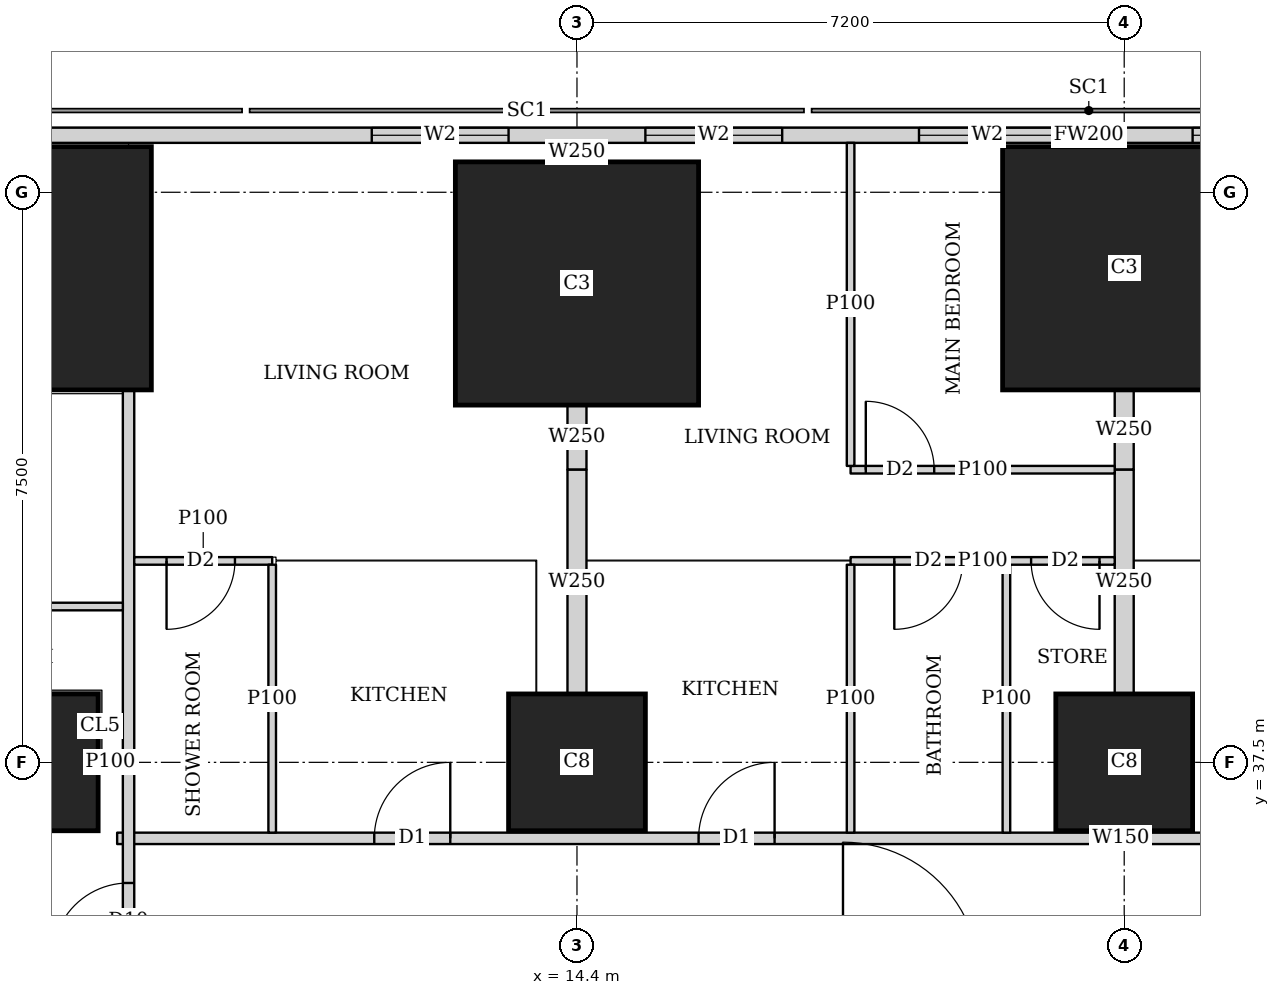
"""IFC4 building model, lengths in metres.
Left out: names, types, materials, properties, quantities, classifications, styles, units other than length and angle.
Written with IfcOpenShell. Run it as: python <this file> out.ifc"""

import sys

from ifc_helpers import new_model, si_unit, direction, frame, frame_2d, origin, origin_2d, place, context, subcontext, project, spatial, rectangle, extrude, element, fill, save


model = new_model("IFC4")
c1 = context("Model", 3, precision=1e-05, world=origin(), true_north=direction((0.0, 1.0)))
c2 = subcontext(c1, "Body", "Model", "MODEL_VIEW")
j1 = project(units=[si_unit("LENGTHUNIT", "METRE"), si_unit("PLANEANGLEUNIT", "RADIAN")], contexts=[c1])
p1 = place(None, origin())
s1 = spatial("IfcSite", under=j1, at=p1, CompositionType="ELEMENT")
p2 = place(p1, origin())
s2 = spatial("IfcBuilding", under=s1, at=p2, CompositionType="ELEMENT")
p3 = place(p2, frame((0.0, 0.0, 20.0)))
s3 = spatial("IfcBuildingStorey", under=s2, at=p3, CompositionType="ELEMENT", Elevation=20.0)
for number, where, z_axis, x_axis in (
    (1, (7.2, 37.5, 0.0), (0.0, 0.0, 1.0), (1.0, 0.0, 0.0)),
    (2, (14.4, 37.5, 0.0), (0.0, 0.0, 1.0), (1.0, 0.0, 0.0)),
    (3, (21.6, 37.5, 0.0), (0.0, 0.0, 1.0), (1.0, 0.0, 0.0)),
):
    element("IfcColumn", number, at=place(p3, frame(where, z_axis=z_axis, x_axis=x_axis)), inside=s3, PredefinedType="COLUMN", context=c2, shape_type="SweptSolid", body=[
        extrude(rectangle(XDim=1.8, YDim=1.8, at=origin_2d()), origin(), (0.0, 0.0, 1.0), 3.75),
    ])
p4 = place(p3, frame((7.2, 44.0, -0.3), z_axis=(0.0, 0.0, 1.0), x_axis=(1.0, 0.0, 0.0)))
e4 = element("IfcColumn", 4, at=p4, inside=s3, PredefinedType="COLUMN", context=c2, shape_type="SweptSolid", body=[
    extrude(rectangle(XDim=3.2, YDim=3.2, at=origin_2d()), origin(), (0.0, 0.0, 1.0), 4.05),
])
p5 = place(p3, frame((14.4, 43.8, 0.0), z_axis=(0.0, 0.0, 1.0), x_axis=(1.0, 0.0, 0.0)))
e5 = element("IfcColumn", 5, at=p5, inside=s3, PredefinedType="COLUMN", context=c2, shape_type="SweptSolid", body=[
    extrude(rectangle(XDim=3.2, YDim=3.2, at=origin_2d()), origin(), (0.0, 0.0, 1.0), 3.75),
])
p6 = place(p3, frame((21.6, 44.0, -0.3), z_axis=(0.0, 0.0, 1.0), x_axis=(1.0, 0.0, 0.0)))
e6 = element("IfcColumn", 6, at=p6, inside=s3, PredefinedType="COLUMN", context=c2, shape_type="SweptSolid", body=[
    extrude(rectangle(XDim=3.2, YDim=3.2, at=origin_2d()), origin(), (0.0, 0.0, 1.0), 4.05),
])
p7 = place(p3, frame((40.106, 45.75, 0.0), z_axis=(0.0, 0.0, 1.0), x_axis=(-1.0, 0.0, 0.0)))
e7 = element("IfcWall", 7, at=p7, inside=s3, PredefinedType="SOLIDWALL", context=c2, shape_type="SweptSolid", body=[
    extrude(rectangle(XDim=37.943, YDim=0.2, at=frame_2d((18.971, 0.0))), origin(), (0.0, 0.0, 1.0), 3.5),
])
p8 = place(p7, frame((8.606, 0.0, 0.9)))
e8 = element("IfcOpeningElement", 8, at=p8, cuts=e7, PredefinedType="OPENING", context=c2, shape_type="SweptSolid", body=[
    extrude(rectangle(XDim=1.8, YDim=1.5, at=frame_2d((0.9, 0.75))), frame((0.0, 0.11, 0.0), z_axis=(0.0, -1.0, 0.0), x_axis=(1.0, 0.0, 0.0)), (0.0, 0.0, 1.0), 0.22),
])
p9 = place(p7, frame((12.206, 0.0, 0.9)))
e9 = element("IfcOpeningElement", 9, at=p9, cuts=e7, PredefinedType="OPENING", context=c2, shape_type="SweptSolid", body=[
    extrude(rectangle(XDim=1.8, YDim=1.5, at=frame_2d((0.9, 0.75))), frame((0.0, 0.11, 0.0), z_axis=(0.0, -1.0, 0.0), x_axis=(1.0, 0.0, 0.0)), (0.0, 0.0, 1.0), 0.22),
])
p10 = place(p7, frame((15.806, 0.0, 0.9)))
e10 = element("IfcOpeningElement", 10, at=p10, cuts=e7, PredefinedType="OPENING", context=c2, shape_type="SweptSolid", body=[
    extrude(rectangle(XDim=1.8, YDim=1.5, at=frame_2d((0.9, 0.75))), frame((0.0, 0.11, 0.0), z_axis=(0.0, -1.0, 0.0), x_axis=(1.0, 0.0, 0.0)), (0.0, 0.0, 1.0), 0.22),
])
p11 = place(p7, frame((19.406, 0.0, 0.9)))
e11 = element("IfcOpeningElement", 11, at=p11, cuts=e7, PredefinedType="OPENING", context=c2, shape_type="SweptSolid", body=[
    extrude(rectangle(XDim=1.8, YDim=1.5, at=frame_2d((0.9, 0.75))), frame((0.0, 0.11, 0.0), z_axis=(0.0, -1.0, 0.0), x_axis=(1.0, 0.0, 0.0)), (0.0, 0.0, 1.0), 0.22),
])
p12 = place(p7, frame((23.006, 0.0, 0.9)))
e12 = element("IfcOpeningElement", 12, at=p12, cuts=e7, PredefinedType="OPENING", context=c2, shape_type="SweptSolid", body=[
    extrude(rectangle(XDim=1.8, YDim=1.5, at=frame_2d((0.9, 0.75))), frame((0.0, 0.11, 0.0), z_axis=(0.0, -1.0, 0.0), x_axis=(1.0, 0.0, 0.0)), (0.0, 0.0, 1.0), 0.22),
])
p13 = place(p7, frame((26.606, 0.0, 0.9)))
e13 = element("IfcOpeningElement", 13, at=p13, cuts=e7, PredefinedType="OPENING", context=c2, shape_type="SweptSolid", body=[
    extrude(rectangle(XDim=1.8, YDim=1.5, at=frame_2d((0.9, 0.75))), frame((0.0, 0.11, 0.0), z_axis=(0.0, -1.0, 0.0), x_axis=(1.0, 0.0, 0.0)), (0.0, 0.0, 1.0), 0.22),
])
p14 = place(p3, frame((8.5, 2.626, 0.0), z_axis=(0.0, 0.0, 1.0), x_axis=(0.0, 1.0, 0.0)))
e14 = element("IfcWall", 14, at=p14, inside=s3, PredefinedType="SOLIDWALL", context=c2, shape_type="SweptSolid", body=[
    extrude(rectangle(XDim=39.773, YDim=0.15, at=frame_2d((19.886, 0.0))), origin(), (0.0, 0.0, 1.0), 2.05),
])
p15 = place(p14, frame((9.786, 0.0, 0.0)))
e15 = element("IfcOpeningElement", 15, at=p15, cuts=e14, PredefinedType="OPENING", context=c2, shape_type="SweptSolid", body=[
    extrude(rectangle(XDim=1.0, YDim=2.0, at=frame_2d((0.5, 1.0))), frame((0.0, 0.085, 0.0), z_axis=(0.0, -1.0, 0.0), x_axis=(1.0, 0.0, 0.0)), (0.0, 0.0, 1.0), 0.17),
])
p16 = place(p14, frame((13.961, 0.0, 0.0)))
e16 = element("IfcOpeningElement", 16, at=p16, cuts=e14, PredefinedType="OPENING", context=c2, shape_type="SweptSolid", body=[
    extrude(rectangle(XDim=1.0, YDim=2.0, at=frame_2d((0.5, 1.0))), frame((0.0, 0.085, 0.0), z_axis=(0.0, -1.0, 0.0), x_axis=(1.0, 0.0, 0.0)), (0.0, 0.0, 1.0), 0.17),
])
p17 = place(p14, frame((24.787, 0.0, 0.0)))
e17 = element("IfcOpeningElement", 17, at=p17, cuts=e14, PredefinedType="OPENING", context=c2, shape_type="SweptSolid", body=[
    extrude(rectangle(XDim=1.0, YDim=2.0, at=frame_2d((0.5, 1.0))), frame((0.0, 0.085, 0.0), z_axis=(0.0, -1.0, 0.0), x_axis=(1.0, 0.0, 0.0)), (0.0, 0.0, 1.0), 0.17),
])
p18 = place(p14, frame((32.287, 0.0, 0.0)))
e18 = element("IfcOpeningElement", 18, at=p18, cuts=e14, PredefinedType="OPENING", context=c2, shape_type="SweptSolid", body=[
    extrude(rectangle(XDim=1.0, YDim=2.0, at=frame_2d((0.5, 1.0))), frame((0.0, 0.085, 0.0), z_axis=(0.0, -1.0, 0.0), x_axis=(1.0, 0.0, 0.0)), (0.0, 0.0, 1.0), 0.17),
])
p19 = place(p3, frame((8.35, 36.5, 0.0), z_axis=(0.0, 0.0, 1.0), x_axis=(1.0, 0.0, 0.0)))
e19 = element("IfcWall", 19, at=p19, inside=s3, PredefinedType="SOLIDWALL", context=c2, shape_type="SweptSolid", body=[
    extrude(rectangle(XDim=26.415, YDim=0.15, at=frame_2d((13.208, 0.0))), origin(), (0.0, 0.0, 1.0), 3.5),
])
p20 = place(p19, frame((3.383, 0.0, 0.0)))
e20 = element("IfcOpeningElement", 20, at=p20, cuts=e19, PredefinedType="OPENING", context=c2, shape_type="SweptSolid", body=[
    extrude(rectangle(XDim=1.0, YDim=2.1, at=frame_2d((0.5, 1.05))), frame((0.0, 0.085, 0.0), z_axis=(0.0, -1.0, 0.0), x_axis=(1.0, 0.0, 0.0)), (0.0, 0.0, 1.0), 0.17),
])
p21 = place(p19, frame((7.65, 0.0, 0.0)))
e21 = element("IfcOpeningElement", 21, at=p21, cuts=e19, PredefinedType="OPENING", context=c2, shape_type="SweptSolid", body=[
    extrude(rectangle(XDim=1.0, YDim=2.1, at=frame_2d((0.5, 1.05))), frame((0.0, 0.085, 0.0), z_axis=(0.0, -1.0, 0.0), x_axis=(1.0, 0.0, 0.0)), (0.0, 0.0, 1.0), 0.17),
])
p22 = place(p19, frame((14.857, 0.0, 0.0)))
e22 = element("IfcOpeningElement", 22, at=p22, cuts=e19, PredefinedType="OPENING", context=c2, shape_type="SweptSolid", body=[
    extrude(rectangle(XDim=1.0, YDim=2.1, at=frame_2d((0.5, 1.05))), frame((0.0, 0.085, 0.0), z_axis=(0.0, -1.0, 0.0), x_axis=(1.0, 0.0, 0.0)), (0.0, 0.0, 1.0), 0.17),
])
p23 = place(p3, frame((8.101, 37.5, 0.0), z_axis=(0.0, 0.0, 1.0), x_axis=(1.0, 0.0, 0.0)))
e23 = element("IfcWall", 23, at=p23, inside=s3, PredefinedType="PARTITIONING", context=c2, shape_type="SweptSolid", body=[
    extrude(rectangle(XDim=0.324, YDim=0.1, at=frame_2d((0.162, 0.0))), origin(), (0.0, 0.0, 1.0), 3.5),
])
p24 = place(p3, frame((4.9, 39.55, 0.0), z_axis=(0.0, 0.0, 1.0), x_axis=(1.0, 0.0, 0.0)))
e24 = element("IfcWall", 24, at=p24, inside=s3, PredefinedType="PARTITIONING", context=c2, shape_type="SweptSolid", body=[
    extrude(rectangle(XDim=3.525, YDim=0.1, at=frame_2d((1.763, 0.0))), origin(), (0.0, 0.0, 1.0), 3.5),
])
p25 = place(p3, frame((8.575, 40.15, 0.0), z_axis=(0.0, 0.0, 1.0), x_axis=(1.0, 0.0, 0.0)))
e25 = element("IfcWall", 25, at=p25, inside=s3, PredefinedType="PARTITIONING", context=c2, shape_type="SweptSolid", body=[
    extrude(rectangle(XDim=1.815, YDim=0.1, at=frame_2d((0.907, 0.0))), origin(), (0.0, 0.0, 1.0), 3.5),
])
p26 = place(p25, frame((0.425, 0.0, 0.0)))
e26 = element("IfcOpeningElement", 26, at=p26, cuts=e25, PredefinedType="OPENING", context=c2, shape_type="SweptSolid", body=[
    extrude(rectangle(XDim=0.9, YDim=2.1, at=frame_2d((0.45, 1.05))), frame((0.0, 0.06, 0.0), z_axis=(0.0, -1.0, 0.0), x_axis=(1.0, 0.0, 0.0)), (0.0, 0.0, 1.0), 0.12),
])
p27 = place(p3, frame((10.39, 36.575, 0.0), z_axis=(0.0, 0.0, 1.0), x_axis=(0.0, 1.0, 0.0)))
e27 = element("IfcWall", 27, at=p27, inside=s3, PredefinedType="PARTITIONING", context=c2, shape_type="SweptSolid", body=[
    extrude(rectangle(XDim=3.525, YDim=0.1, at=frame_2d((1.763, 0.0))), origin(), (0.0, 0.0, 1.0), 3.5),
])
p28 = place(p3, frame((18.0, 41.35, 0.0), z_axis=(0.0, 0.0, 1.0), x_axis=(1.0, 0.0, 0.0)))
e28 = element("IfcWall", 28, at=p28, inside=s3, PredefinedType="PARTITIONING", context=c2, shape_type="SweptSolid", body=[
    extrude(rectangle(XDim=3.475, YDim=0.1, at=frame_2d((1.738, 0.0))), origin(), (0.0, 0.0, 1.0), 3.5),
])
p29 = place(p28, frame((0.2, 0.0, 0.0)))
e29 = element("IfcOpeningElement", 29, at=p29, cuts=e28, PredefinedType="OPENING", context=c2, shape_type="SweptSolid", body=[
    extrude(rectangle(XDim=0.9, YDim=2.1, at=frame_2d((0.45, 1.05))), frame((0.0, 0.06, 0.0), z_axis=(0.0, -1.0, 0.0), x_axis=(1.0, 0.0, 0.0)), (0.0, 0.0, 1.0), 0.12),
])
p30 = place(p3, frame((18.0, 40.15, 0.0), z_axis=(0.0, 0.0, 1.0), x_axis=(1.0, 0.0, 0.0)))
e30 = element("IfcWall", 30, at=p30, inside=s3, PredefinedType="PARTITIONING", context=c2, shape_type="SweptSolid", body=[
    extrude(rectangle(XDim=3.475, YDim=0.1, at=frame_2d((1.738, 0.0))), origin(), (0.0, 0.0, 1.0), 3.5),
])
p31 = place(p30, frame((0.575, 0.0, 0.0)))
e31 = element("IfcOpeningElement", 31, at=p31, cuts=e30, PredefinedType="OPENING", context=c2, shape_type="SweptSolid", body=[
    extrude(rectangle(XDim=0.9, YDim=2.1, at=frame_2d((0.45, 1.05))), frame((0.0, 0.06, 0.0), z_axis=(0.0, -1.0, 0.0), x_axis=(1.0, 0.0, 0.0)), (0.0, 0.0, 1.0), 0.12),
])
p32 = place(p30, frame((2.375, 0.0, 0.0)))
e32 = element("IfcOpeningElement", 32, at=p32, cuts=e30, PredefinedType="OPENING", context=c2, shape_type="SweptSolid", body=[
    extrude(rectangle(XDim=0.9, YDim=2.1, at=frame_2d((0.45, 1.05))), frame((0.0, 0.06, 0.0), z_axis=(0.0, -1.0, 0.0), x_axis=(1.0, 0.0, 0.0)), (0.0, 0.0, 1.0), 0.12),
])
p33 = place(p3, frame((18.0, 41.4, 0.0), z_axis=(0.0, 0.0, 1.0), x_axis=(0.0, 1.0, 0.0)))
e33 = element("IfcWall", 33, at=p33, inside=s3, PredefinedType="PARTITIONING", context=c2, shape_type="SweptSolid", body=[
    extrude(rectangle(XDim=4.25, YDim=0.1, at=frame_2d((2.125, 0.0))), origin(), (0.0, 0.0, 1.0), 2.05),
])
for number, where, z_axis, x_axis in (
    (34, (18.0, 36.575, 0.0), (0.0, 0.0, 1.0), (0.0, 1.0, 0.0)),
    (35, (20.05, 36.575, 0.0), (0.0, 0.0, 1.0), (0.0, 1.0, 0.0)),
):
    element("IfcWall", number, at=place(p3, frame(where, z_axis=z_axis, x_axis=x_axis)), inside=s3, PredefinedType="PARTITIONING", context=c2, shape_type="SweptSolid", body=[
        extrude(rectangle(XDim=3.525, YDim=0.1, at=frame_2d((1.763, 0.0))), origin(), (0.0, 0.0, 1.0), 3.5),
    ])
p34 = place(p3, frame((14.4, 41.35, 0.0), z_axis=(0.0, 0.0, 1.0), x_axis=(0.0, 1.0, 0.0)))
e36 = element("IfcWall", 36, at=p34, inside=s3, PredefinedType="SOLIDWALL", context=c2, shape_type="SweptSolid", body=[
    extrude(rectangle(XDim=0.849, YDim=0.25, at=frame_2d((0.424, 0.0))), origin(), (0.0, 0.0, 1.0), 2.05),
])
p35 = place(p3, frame((14.4, 45.401, 0.0), z_axis=(0.0, 0.0, 1.0), x_axis=(0.0, 1.0, 0.0)))
e37 = element("IfcWall", 37, at=p35, inside=s3, PredefinedType="SOLIDWALL", context=c2, shape_type="SweptSolid", body=[
    extrude(rectangle(XDim=0.249, YDim=0.25, at=frame_2d((0.125, 0.0))), origin(), (0.0, 0.0, 1.0), 2.05),
])
p36 = place(p3, frame((14.4, 38.401, 0.0), z_axis=(0.0, 0.0, 1.0), x_axis=(0.0, 1.0, 0.0)))
e38 = element("IfcWall", 38, at=p36, inside=s3, PredefinedType="SOLIDWALL", context=c2, shape_type="SweptSolid", body=[
    extrude(rectangle(XDim=2.949, YDim=0.25, at=frame_2d((1.475, 0.0))), origin(), (0.0, 0.0, 1.0), 3.5),
])
p37 = place(p3, frame((21.6, 41.35, 0.0), z_axis=(0.0, 0.0, 1.0), x_axis=(0.0, 1.0, 0.0)))
e39 = element("IfcWall", 39, at=p37, inside=s3, PredefinedType="SOLIDWALL", context=c2, shape_type="SweptSolid", body=[
    extrude(rectangle(XDim=1.049, YDim=0.25, at=frame_2d((0.524, 0.0))), origin(), (0.0, 0.0, 1.0), 2.05),
])
p38 = place(p3, frame((21.6, 38.401, 0.0), z_axis=(0.0, 0.0, 1.0), x_axis=(0.0, 1.0, 0.0)))
e40 = element("IfcWall", 40, at=p38, inside=s3, PredefinedType="SOLIDWALL", context=c2, shape_type="SweptSolid", body=[
    extrude(rectangle(XDim=2.949, YDim=0.25, at=frame_2d((1.475, 0.0))), origin(), (0.0, 0.0, 1.0), 3.5),
])
p39 = place(p10, origin())
e41 = element("IfcWindow", 41, at=p39, inside=s3, PartitioningType="SINGLE_PANEL", PredefinedType="WINDOW", context=c2, shape_type="SweptSolid", body=[
    extrude(rectangle(XDim=1.8, YDim=1.5, at=frame_2d((0.9, 0.75))), frame((0.0, 0.03, 0.0), z_axis=(0.0, -1.0, 0.0), x_axis=(1.0, 0.0, 0.0)), (0.0, 0.0, 1.0), 0.06),
])
fill(e10, e41)
p40 = place(p11, origin())
e42 = element("IfcWindow", 42, at=p40, inside=s3, PartitioningType="SINGLE_PANEL", PredefinedType="WINDOW", context=c2, shape_type="SweptSolid", body=[
    extrude(rectangle(XDim=1.8, YDim=1.5, at=frame_2d((0.9, 0.75))), frame((0.0, 0.03, 0.0), z_axis=(0.0, -1.0, 0.0), x_axis=(1.0, 0.0, 0.0)), (0.0, 0.0, 1.0), 0.06),
])
fill(e11, e42)
p41 = place(p12, origin())
e43 = element("IfcWindow", 43, at=p41, inside=s3, PartitioningType="SINGLE_PANEL", PredefinedType="WINDOW", context=c2, shape_type="SweptSolid", body=[
    extrude(rectangle(XDim=1.8, YDim=1.5, at=frame_2d((0.9, 0.75))), frame((0.0, 0.03, 0.0), z_axis=(0.0, -1.0, 0.0), x_axis=(1.0, 0.0, 0.0)), (0.0, 0.0, 1.0), 0.06),
])
fill(e12, e43)
p42 = place(p13, origin())
e44 = element("IfcWindow", 44, at=p42, inside=s3, PartitioningType="SINGLE_PANEL", PredefinedType="WINDOW", context=c2, shape_type="SweptSolid", body=[
    extrude(rectangle(XDim=1.8, YDim=1.5, at=frame_2d((0.9, 0.75))), frame((0.0, 0.03, 0.0), z_axis=(0.0, -1.0, 0.0), x_axis=(1.0, 0.0, 0.0)), (0.0, 0.0, 1.0), 0.06),
])
fill(e13, e44)
p43 = place(p18, origin())
e45 = element("IfcDoor", 45, at=p43, inside=s3, OperationType="SINGLE_SWING_LEFT", PredefinedType="DOOR", context=c2, shape_type="SweptSolid", body=[
    extrude(rectangle(XDim=1.0, YDim=2.0, at=frame_2d((0.5, 1.0))), frame((0.0, 0.025, 0.0), z_axis=(0.0, -1.0, 0.0), x_axis=(1.0, 0.0, 0.0)), (0.0, 0.0, 1.0), 0.05),
])
fill(e18, e45)
p44 = place(p26, origin())
e46 = element("IfcDoor", 46, at=p44, inside=s3, OperationType="SINGLE_SWING_RIGHT", PredefinedType="DOOR", context=c2, shape_type="SweptSolid", body=[
    extrude(rectangle(XDim=0.9, YDim=2.1, at=frame_2d((0.45, 1.05))), frame((0.0, 0.025, 0.0), z_axis=(0.0, -1.0, 0.0), x_axis=(1.0, 0.0, 0.0)), (0.0, 0.0, 1.0), 0.05),
])
fill(e26, e46)
p45 = place(p20, origin())
e47 = element("IfcDoor", 47, at=p45, inside=s3, OperationType="SINGLE_SWING_RIGHT", PredefinedType="DOOR", context=c2, shape_type="SweptSolid", body=[
    extrude(rectangle(XDim=1.0, YDim=2.1, at=frame_2d((0.5, 1.05))), frame((0.0, 0.025, 0.0), z_axis=(0.0, -1.0, 0.0), x_axis=(1.0, 0.0, 0.0)), (0.0, 0.0, 1.0), 0.05),
])
fill(e20, e47)
p46 = place(p29, origin())
e48 = element("IfcDoor", 48, at=p46, inside=s3, OperationType="SINGLE_SWING_LEFT", PredefinedType="DOOR", context=c2, shape_type="SweptSolid", body=[
    extrude(rectangle(XDim=0.9, YDim=2.1, at=frame_2d((0.45, 1.05))), frame((0.0, 0.025, 0.0), z_axis=(0.0, -1.0, 0.0), x_axis=(1.0, 0.0, 0.0)), (0.0, 0.0, 1.0), 0.05),
])
fill(e29, e48)
p47 = place(p31, origin())
e49 = element("IfcDoor", 49, at=p47, inside=s3, OperationType="SINGLE_SWING_RIGHT", PredefinedType="DOOR", context=c2, shape_type="SweptSolid", body=[
    extrude(rectangle(XDim=0.9, YDim=2.1, at=frame_2d((0.45, 1.05))), frame((0.0, 0.025, 0.0), z_axis=(0.0, -1.0, 0.0), x_axis=(1.0, 0.0, 0.0)), (0.0, 0.0, 1.0), 0.05),
])
fill(e31, e49)
p48 = place(p32, origin())
e50 = element("IfcDoor", 50, at=p48, inside=s3, OperationType="SINGLE_SWING_LEFT", PredefinedType="DOOR", context=c2, shape_type="SweptSolid", body=[
    extrude(rectangle(XDim=0.9, YDim=2.1, at=frame_2d((0.45, 1.05))), frame((0.0, 0.025, 0.0), z_axis=(0.0, -1.0, 0.0), x_axis=(1.0, 0.0, 0.0)), (0.0, 0.0, 1.0), 0.05),
])
fill(e32, e50)
p49 = place(p21, origin())
e51 = element("IfcDoor", 51, at=p49, inside=s3, OperationType="SINGLE_SWING_RIGHT", PredefinedType="DOOR", context=c2, shape_type="SweptSolid", body=[
    extrude(rectangle(XDim=1.0, YDim=2.1, at=frame_2d((0.5, 1.05))), frame((0.0, 0.025, 0.0), z_axis=(0.0, -1.0, 0.0), x_axis=(1.0, 0.0, 0.0)), (0.0, 0.0, 1.0), 0.05),
])
fill(e21, e51)
save(model, sys.argv[1])
